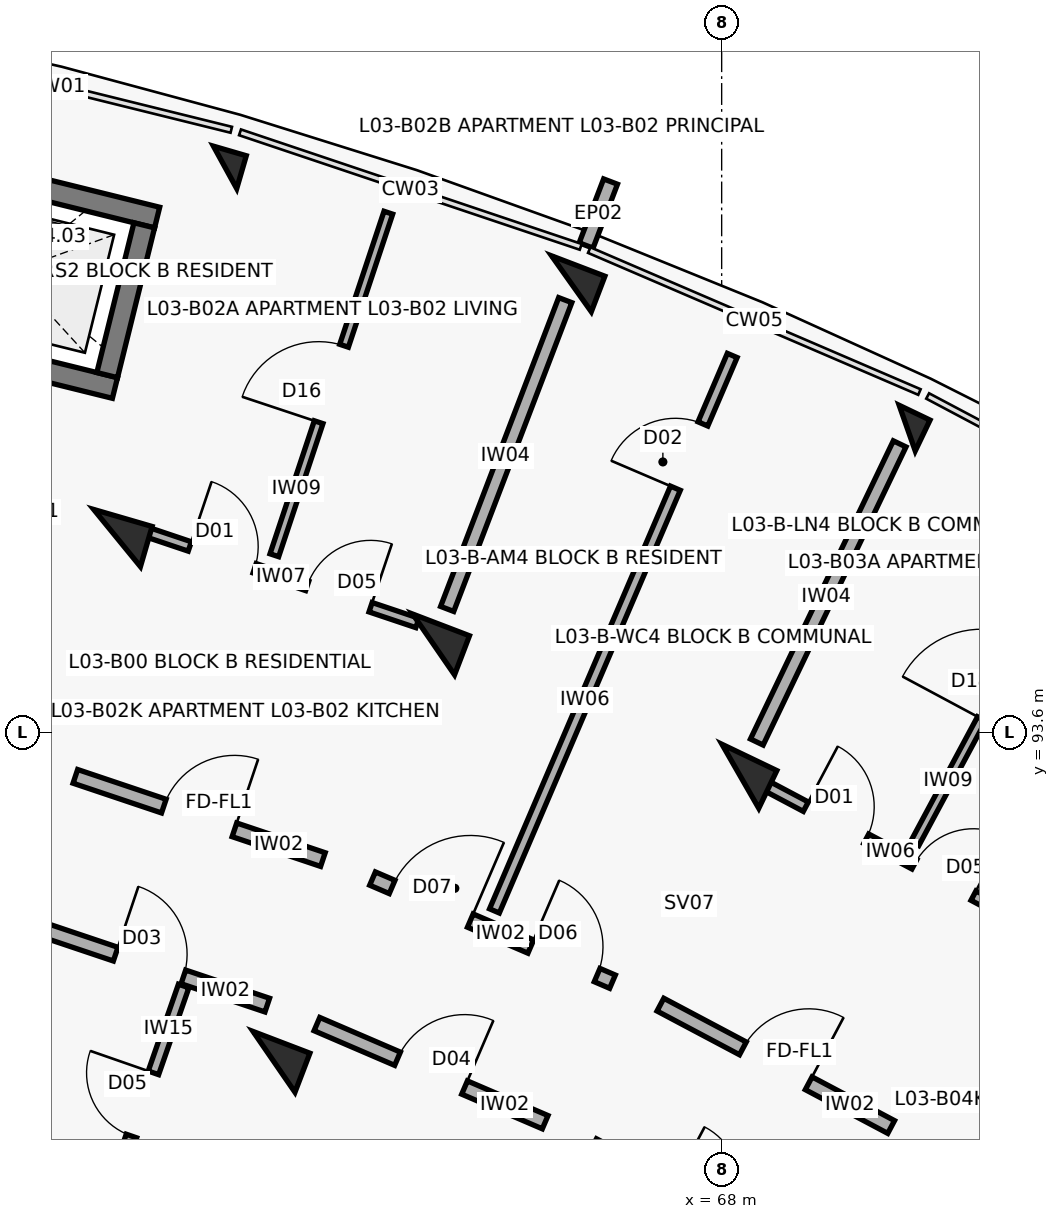
"""IFC4 building model, lengths in metres.
Left out: names, types, materials, properties, quantities, classifications, styles, units other than length and angle.
Written with IfcOpenShell. Run it as: python <this file> out.ifc"""

import sys

from ifc_helpers import new_model, si_unit, direction, frame, frame_2d, origin, origin_2d, place, context, subcontext, project, spatial, rectangle, extrude, element, fill, save


model = new_model("IFC4")
c1 = context("Model", 3, precision=1e-05, world=origin(), true_north=direction((0.0, 1.0)))
c2 = subcontext(c1, "Body", "Model", "MODEL_VIEW")
j1 = project(units=[si_unit("LENGTHUNIT", "METRE"), si_unit("PLANEANGLEUNIT", "RADIAN")], contexts=[c1])
p1 = place(None, origin())
s1 = spatial("IfcSite", under=j1, at=p1, CompositionType="ELEMENT")
p2 = place(p1, origin())
s2 = spatial("IfcBuilding", under=s1, at=p2, CompositionType="ELEMENT")
p3 = place(p2, frame((0.0, 0.0, 11.2)))
s3 = spatial("IfcBuildingStorey", under=s2, at=p3, CompositionType="ELEMENT", Elevation=11.2)
p4 = place(p3, frame((60.046, 96.153, 0.0), z_axis=(0.0, 0.0, 1.0), x_axis=(0.27966144946, 0.96009867914, 0.0)))
e1 = element("IfcColumn", 1, at=p4, inside=s3, PredefinedType="COLUMN", context=c2, shape_type="SweptSolid", body=[
    extrude(rectangle(XDim=0.55, YDim=0.8, at=origin_2d()), origin(), (0.0, 0.0, 1.0), 3.1),
])
p5 = place(p3, frame((61.467, 101.031, 0.0), z_axis=(0.0, 0.0, 1.0), x_axis=(0.27966144946, 0.96009867914, 0.0)))
e2 = element("IfcColumn", 2, at=p5, inside=s3, PredefinedType="COLUMN", context=c2, shape_type="SweptSolid", body=[
    extrude(rectangle(XDim=0.45, YDim=0.45, at=origin_2d()), origin(), (0.0, 0.0, 1.0), 3.1),
])
for number, where, z_axis, x_axis in (
    (3, (62.111, 89.261, 0.0), (0.0, 0.0, 1.0), (0.357, 0.934, 0.0)),
    (4, (64.21, 94.753, 0.0), (0.0, 0.0, 1.0), (0.357, 0.934, 0.0)),
):
    element("IfcColumn", number, at=place(p3, frame(where, z_axis=z_axis, x_axis=x_axis)), inside=s3, PredefinedType="COLUMN", context=c2, shape_type="SweptSolid", body=[
        extrude(rectangle(XDim=0.55, YDim=0.8, at=origin_2d()), origin(), (0.0, 0.0, 1.0), 3.1),
    ])
p6 = place(p3, frame((66.024, 99.499, 0.0), z_axis=(0.0, 0.0, 1.0), x_axis=(0.357064076459, 0.934079892355, 0.0)))
e5 = element("IfcColumn", 5, at=p6, inside=s3, PredefinedType="COLUMN", context=c2, shape_type="SweptSolid", body=[
    extrude(rectangle(XDim=0.5, YDim=0.75, at=origin_2d()), origin(), (0.0, 0.0, 1.0), 3.1),
])
p7 = place(p3, frame((68.246, 93.019, 0.0), z_axis=(0.0, 0.0, 1.0), x_axis=(0.432085748802, 0.901832526405, 0.0)))
e6 = element("IfcColumn", 6, at=p7, inside=s3, PredefinedType="COLUMN", context=c2, shape_type="SweptSolid", body=[
    extrude(rectangle(XDim=0.55, YDim=0.8, at=origin_2d()), origin(), (0.0, 0.0, 1.0), 3.1),
])
p8 = place(p3, frame((70.441, 97.6, 0.0), z_axis=(0.0, 0.0, 1.0), x_axis=(0.432085748802, 0.901832526405, 0.0)))
e7 = element("IfcColumn", 7, at=p8, inside=s3, PredefinedType="COLUMN", context=c2, shape_type="SweptSolid", body=[
    extrude(rectangle(XDim=0.45, YDim=0.45, at=origin_2d()), origin(), (0.0, 0.0, 1.0), 3.1),
])
p9 = place(p3, frame((66.217, 100.003, 0.0), z_axis=(0.0, 0.0, 1.0), x_axis=(0.356942580168, 0.934126326823, 0.0)))
e8 = element("IfcWall", 8, at=p9, inside=s3, PredefinedType="PARAPET", context=c2, shape_type="SweptSolid", body=[
    extrude(rectangle(XDim=0.9, YDim=0.195, at=frame_2d((0.45, 0.0))), origin(), (0.0, 0.0, 1.0), 2.25),
])
p10 = place(p3, frame((60.018, 98.128, 0.0), z_axis=(0.0, 0.0, 1.0), x_axis=(-0.970707542441, 0.240264160972, 0.0)))
e9 = element("IfcWall", 9, at=p10, inside=s3, PredefinedType="SHEAR", context=c2, shape_type="SweptSolid", body=[
    extrude(rectangle(XDim=3.39, YDim=0.28, at=frame_2d((1.695, 0.0))), origin(), (0.0, 0.0, 1.0), 3.1),
])
p11 = place(p10, frame((1.095, 0.0, 0.0)))
e10 = element("IfcOpeningElement", 10, at=p11, cuts=e9, PredefinedType="OPENING", context=c2, shape_type="SweptSolid", body=[
    extrude(rectangle(XDim=1.2, YDim=2.15, at=frame_2d((0.6, 1.075))), frame((0.0, 0.15, 0.0), z_axis=(0.0, -1.0, 0.0), x_axis=(1.0, 0.0, 0.0)), (0.0, 0.0, 1.0), 0.3),
])
p12 = place(p3, frame((60.573, 100.37, 0.0), z_axis=(0.0, 0.0, 1.0), x_axis=(-0.970711699588, 0.240247364777, 0.0)))
e11 = element("IfcWall", 11, at=p12, inside=s3, PredefinedType="SHEAR", context=c2, shape_type="SweptSolid", body=[
    extrude(rectangle(XDim=3.39, YDim=0.28, at=frame_2d((1.695, 0.0))), origin(), (0.0, 0.0, 1.0), 3.1),
])
p13 = place(p3, frame((59.915, 98.297, 0.0), z_axis=(0.0, 0.0, 1.0), x_axis=(0.2402993748, 0.970698825832, 0.0)))
e12 = element("IfcWall", 12, at=p13, inside=s3, PredefinedType="SHEAR", context=c2, shape_type="SweptSolid", body=[
    extrude(rectangle(XDim=2.03, YDim=0.28, at=frame_2d((1.015, 0.0))), origin(), (0.0, 0.0, 1.0), 3.1),
])
p14 = place(p3, frame((59.497, 93.018, 0.0), z_axis=(0.0, 0.0, 1.0), x_axis=(0.947863007629, -0.318678080151, 0.0)))
e13 = element("IfcWall", 13, at=p14, inside=s3, PredefinedType="SOLIDWALL", context=c2, shape_type="SweptSolid", body=[
    extrude(rectangle(XDim=3.436, YDim=0.19, at=frame_2d((1.718, 0.0))), origin(), (0.0, 0.0, 1.0), 2.08),
])
p15 = place(p14, frame((1.228, 0.0, 0.0)))
e14 = element("IfcOpeningElement", 14, at=p15, cuts=e13, PredefinedType="OPENING", context=c2, shape_type="SweptSolid", body=[
    extrude(rectangle(XDim=0.98, YDim=2.15, at=frame_2d((0.49, 1.075))), frame((0.0, 0.105, 0.0), z_axis=(0.0, -1.0, 0.0), x_axis=(1.0, 0.0, 0.0)), (0.0, 0.0, 1.0), 0.21),
])
p16 = place(p3, frame((58.923, 91.049, 0.0), z_axis=(0.0, 0.0, 1.0), x_axis=(0.94787351033, -0.318646839643, 0.0)))
e15 = element("IfcWall", 15, at=p16, inside=s3, PredefinedType="SOLIDWALL", context=c2, shape_type="SweptSolid", body=[
    extrude(rectangle(XDim=3.269, YDim=0.19, at=frame_2d((1.634, 0.0))), origin(), (0.0, 0.0, 1.0), 2.08),
])
p17 = place(p16, frame((1.164, 0.0, 0.0)))
e16 = element("IfcOpeningElement", 16, at=p17, cuts=e15, PredefinedType="OPENING", context=c2, shape_type="SweptSolid", body=[
    extrude(rectangle(XDim=0.94, YDim=2.1, at=frame_2d((0.47, 1.05))), frame((0.0, 0.105, 0.0), z_axis=(0.0, -1.0, 0.0), x_axis=(1.0, 0.0, 0.0)), (0.0, 0.0, 1.0), 0.21),
])
p18 = place(p3, frame((59.837, 87.143, 0.0), z_axis=(0.0, 0.0, 1.0), x_axis=(0.328629662527, 0.944458863534, 0.0)))
e17 = element("IfcWall", 17, at=p18, inside=s3, PredefinedType="PARTITIONING", context=c2, shape_type="SweptSolid", body=[
    extrude(rectangle(XDim=3.3, YDim=0.145, at=frame_2d((1.65, 0.0))), origin(), (0.0, 0.0, 1.0), 2.08),
])
p19 = place(p18, frame((1.21, 0.0, 0.0)))
e18 = element("IfcOpeningElement", 18, at=p19, cuts=e17, PredefinedType="OPENING", context=c2, shape_type="SweptSolid", body=[
    extrude(rectangle(XDim=0.88, YDim=2.1, at=frame_2d((0.44, 1.05))), frame((0.0, 0.083, 0.0), z_axis=(0.0, -1.0, 0.0), x_axis=(1.0, 0.0, 0.0)), (0.0, 0.0, 1.0), 0.165),
])
p20 = place(p3, frame((60.386, 96.25, 0.0), z_axis=(0.0, 0.0, 1.0), x_axis=(0.947879193428, -0.318629933725, 0.0)))
e19 = element("IfcWall", 19, at=p20, inside=s3, PredefinedType="PARTITIONING", context=c2, shape_type="SweptSolid", body=[
    extrude(rectangle(XDim=3.81, YDim=0.13, at=frame_2d((1.905, 0.0))), origin(), (0.0, 0.0, 1.0), 2.08),
])
p21 = place(p20, frame((0.65, 0.0, 0.0)))
e20 = element("IfcOpeningElement", 20, at=p21, cuts=e19, PredefinedType="OPENING", context=c2, shape_type="SweptSolid", body=[
    extrude(rectangle(XDim=0.9, YDim=2.1, at=frame_2d((0.45, 1.05))), frame((0.0, 0.075, 0.0), z_axis=(0.0, -1.0, 0.0), x_axis=(1.0, 0.0, 0.0)), (0.0, 0.0, 1.0), 0.15),
])
p22 = place(p20, frame((2.28, 0.0, 0.0)))
e21 = element("IfcOpeningElement", 21, at=p22, cuts=e19, PredefinedType="OPENING", context=c2, shape_type="SweptSolid", body=[
    extrude(rectangle(XDim=0.88, YDim=2.1, at=frame_2d((0.44, 1.05))), frame((0.0, 0.075, 0.0), z_axis=(0.0, -1.0, 0.0), x_axis=(1.0, 0.0, 0.0)), (0.0, 0.0, 1.0), 0.15),
])
p23 = place(p3, frame((62.115, 95.927, 0.0), z_axis=(0.0, 0.0, 1.0), x_axis=(0.31574970662, 0.94884251737, 0.0)))
e22 = element("IfcWall", 22, at=p23, inside=s3, PredefinedType="PARTITIONING", context=c2, shape_type="SweptSolid", body=[
    extrude(rectangle(XDim=4.75, YDim=0.12, at=frame_2d((2.375, 0.0))), origin(), (0.0, 0.0, 1.0), 2.08),
])
p24 = place(p23, frame((1.845, 0.0, 0.0)))
e23 = element("IfcOpeningElement", 23, at=p24, cuts=e22, PredefinedType="OPENING", context=c2, shape_type="SweptSolid", body=[
    extrude(rectangle(XDim=1.06, YDim=2.1, at=frame_2d((0.53, 1.05))), frame((0.0, 0.07, 0.0), z_axis=(0.0, -1.0, 0.0), x_axis=(1.0, 0.0, 0.0)), (0.0, 0.0, 1.0), 0.14),
])
p25 = place(p3, frame((63.407, 91.673, 0.0), z_axis=(0.0, 0.0, 1.0), x_axis=(0.918718172399, -0.394913813008, 0.0)))
e24 = element("IfcWall", 24, at=p25, inside=s3, PredefinedType="SOLIDWALL", context=c2, shape_type="SweptSolid", body=[
    extrude(rectangle(XDim=3.436, YDim=0.19, at=frame_2d((1.718, 0.0))), origin(), (0.0, 0.0, 1.0), 2.08),
])
p26 = place(p25, frame((0.28, 0.0, 0.0)))
e25 = element("IfcOpeningElement", 25, at=p26, cuts=e24, PredefinedType="OPENING", context=c2, shape_type="SweptSolid", body=[
    extrude(rectangle(XDim=1.12, YDim=2.15, at=frame_2d((0.56, 1.075))), frame((0.0, 0.105, 0.0), z_axis=(0.0, -1.0, 0.0), x_axis=(1.0, 0.0, 0.0)), (0.0, 0.0, 1.0), 0.21),
])
p27 = place(p25, frame((2.266, 0.0, 0.0)))
e26 = element("IfcOpeningElement", 26, at=p27, cuts=e24, PredefinedType="OPENING", context=c2, shape_type="SweptSolid", body=[
    extrude(rectangle(XDim=0.95, YDim=2.1, at=frame_2d((0.475, 1.05))), frame((0.0, 0.105, 0.0), z_axis=(0.0, -1.0, 0.0), x_axis=(1.0, 0.0, 0.0)), (0.0, 0.0, 1.0), 0.21),
])
p28 = place(p3, frame((62.675, 89.758, 0.0), z_axis=(0.0, 0.0, 1.0), x_axis=(0.918723391052, -0.394901672235, 0.0)))
e27 = element("IfcWall", 27, at=p28, inside=s3, PredefinedType="SOLIDWALL", context=c2, shape_type="SweptSolid", body=[
    extrude(rectangle(XDim=3.269, YDim=0.19, at=frame_2d((1.634, 0.0))), origin(), (0.0, 0.0, 1.0), 2.08),
])
p29 = place(p28, frame((1.154, 0.0, 0.0)))
e28 = element("IfcOpeningElement", 28, at=p29, cuts=e27, PredefinedType="OPENING", context=c2, shape_type="SweptSolid", body=[
    extrude(rectangle(XDim=0.96, YDim=2.1, at=frame_2d((0.48, 1.05))), frame((0.0, 0.105, 0.0), z_axis=(0.0, -1.0, 0.0), x_axis=(1.0, 0.0, 0.0)), (0.0, 0.0, 1.0), 0.21),
])
p30 = place(p3, frame((65.01, 91.247, 0.0), z_axis=(0.0, 0.0, 1.0), x_axis=(0.393511564709, 0.919319666079, 0.0)))
e29 = element("IfcWall", 29, at=p30, inside=s3, PredefinedType="PARTITIONING", context=c2, shape_type="SweptSolid", body=[
    extrude(rectangle(XDim=7.95, YDim=0.14, at=frame_2d((3.975, 0.0))), origin(), (0.0, 0.0, 1.0), 2.08),
])
p31 = place(p30, frame((6.05, 0.0, 0.0)))
e30 = element("IfcOpeningElement", 30, at=p31, cuts=e29, PredefinedType="OPENING", context=c2, shape_type="SweptSolid", body=[
    extrude(rectangle(XDim=0.92, YDim=2.1, at=frame_2d((0.46, 1.05))), frame((0.0, 0.08, 0.0), z_axis=(0.0, -1.0, 0.0), x_axis=(1.0, 0.0, 0.0)), (0.0, 0.0, 1.0), 0.16),
])
p32 = place(p3, frame((64.389, 95.22, 0.0), z_axis=(0.0, 0.0, 1.0), x_axis=(0.357064016205, 0.934079915388, 0.0)))
e31 = element("IfcWall", 31, at=p32, inside=s3, PredefinedType="SOLIDWALL", context=c2, shape_type="SweptSolid", body=[
    extrude(rectangle(XDim=4.35, YDim=0.185, at=frame_2d((2.175, 0.0))), origin(), (0.0, 0.0, 1.0), 2.08),
])
p33 = place(p3, frame((67.194, 90.014, 0.0), z_axis=(0.0, 0.0, 1.0), x_axis=(0.883410853063, -0.468599258099, 0.0)))
e32 = element("IfcWall", 32, at=p33, inside=s3, PredefinedType="SOLIDWALL", context=c2, shape_type="SweptSolid", body=[
    extrude(rectangle(XDim=3.436, YDim=0.19, at=frame_2d((1.718, 0.0))), origin(), (0.0, 0.0, 1.0), 2.08),
])
p34 = place(p33, frame((1.228, 0.0, 0.0)))
e33 = element("IfcOpeningElement", 33, at=p34, cuts=e32, PredefinedType="OPENING", context=c2, shape_type="SweptSolid", body=[
    extrude(rectangle(XDim=0.98, YDim=2.15, at=frame_2d((0.49, 1.075))), frame((0.0, 0.105, 0.0), z_axis=(0.0, -1.0, 0.0), x_axis=(1.0, 0.0, 0.0)), (0.0, 0.0, 1.0), 0.21),
])
p35 = place(p3, frame((68.533, 92.923, 0.0), z_axis=(0.0, 0.0, 1.0), x_axis=(0.88341855112, -0.46858474531, 0.0)))
e34 = element("IfcWall", 34, at=p35, inside=s3, PredefinedType="PARTITIONING", context=c2, shape_type="SweptSolid", body=[
    extrude(rectangle(XDim=3.797, YDim=0.14, at=frame_2d((1.898, 0.0))), origin(), (0.0, 0.0, 1.0), 2.08),
])
p36 = place(p35, frame((0.65, 0.0, 0.0)))
e35 = element("IfcOpeningElement", 35, at=p36, cuts=e34, PredefinedType="OPENING", context=c2, shape_type="SweptSolid", body=[
    extrude(rectangle(XDim=0.9, YDim=2.1, at=frame_2d((0.45, 1.05))), frame((0.0, 0.08, 0.0), z_axis=(0.0, -1.0, 0.0), x_axis=(1.0, 0.0, 0.0)), (0.0, 0.0, 1.0), 0.16),
])
p37 = place(p35, frame((2.267, 0.0, 0.0)))
e36 = element("IfcOpeningElement", 36, at=p37, cuts=e34, PredefinedType="OPENING", context=c2, shape_type="SweptSolid", body=[
    extrude(rectangle(XDim=0.88, YDim=2.1, at=frame_2d((0.44, 1.05))), frame((0.0, 0.08, 0.0), z_axis=(0.0, -1.0, 0.0), x_axis=(1.0, 0.0, 0.0)), (0.0, 0.0, 1.0), 0.16),
])
p38 = place(p3, frame((70.541, 92.135, 0.0), z_axis=(0.0, 0.0, 1.0), x_axis=(0.472542158723, 0.881308066586, 0.0)))
e37 = element("IfcWall", 37, at=p38, inside=s3, PredefinedType="PARTITIONING", context=c2, shape_type="SweptSolid", body=[
    extrude(rectangle(XDim=4.9, YDim=0.12, at=frame_2d((2.45, 0.0))), origin(), (0.0, 0.0, 1.0), 2.08),
])
p39 = place(p38, frame((1.86, 0.0, 0.0)))
e38 = element("IfcOpeningElement", 38, at=p39, cuts=e37, PredefinedType="OPENING", context=c2, shape_type="SweptSolid", body=[
    extrude(rectangle(XDim=1.18, YDim=2.1, at=frame_2d((0.59, 1.05))), frame((0.0, 0.07, 0.0), z_axis=(0.0, -1.0, 0.0), x_axis=(1.0, 0.0, 0.0)), (0.0, 0.0, 1.0), 0.14),
])
p40 = place(p3, frame((68.462, 93.469, 0.0), z_axis=(0.0, 0.0, 1.0), x_axis=(0.432086898897, 0.901831975371, 0.0)))
e39 = element("IfcWall", 39, at=p40, inside=s3, PredefinedType="SOLIDWALL", context=c2, shape_type="SweptSolid", body=[
    extrude(rectangle(XDim=4.35, YDim=0.185, at=frame_2d((2.175, 0.0))), origin(), (0.0, 0.0, 1.0), 2.08),
])
p41 = place(p15, origin())
e40 = element("IfcDoor", 40, at=p41, inside=s3, OperationType="SINGLE_SWING_RIGHT", PredefinedType="DOOR", context=c2, shape_type="SweptSolid", body=[
    extrude(rectangle(XDim=0.98, YDim=2.15, at=frame_2d((0.49, 1.075))), frame((0.0, 0.025, 0.0), z_axis=(0.0, -1.0, 0.0), x_axis=(1.0, 0.0, 0.0)), (0.0, 0.0, 1.0), 0.05),
])
fill(e14, e40)
p42 = place(p17, origin())
e41 = element("IfcDoor", 41, at=p42, inside=s3, OperationType="SINGLE_SWING_LEFT", PredefinedType="DOOR", context=c2, shape_type="SweptSolid", body=[
    extrude(rectangle(XDim=0.94, YDim=2.1, at=frame_2d((0.47, 1.05))), frame((0.0, 0.025, 0.0), z_axis=(0.0, -1.0, 0.0), x_axis=(1.0, 0.0, 0.0)), (0.0, 0.0, 1.0), 0.05),
])
fill(e16, e41)
p43 = place(p19, origin())
e42 = element("IfcDoor", 42, at=p43, inside=s3, OperationType="SINGLE_SWING_RIGHT", PredefinedType="DOOR", context=c2, shape_type="SweptSolid", body=[
    extrude(rectangle(XDim=0.88, YDim=2.1, at=frame_2d((0.44, 1.05))), frame((0.0, 0.025, 0.0), z_axis=(0.0, -1.0, 0.0), x_axis=(1.0, 0.0, 0.0)), (0.0, 0.0, 1.0), 0.05),
])
fill(e18, e42)
p44 = place(p21, origin())
e43 = element("IfcDoor", 43, at=p44, inside=s3, OperationType="SINGLE_SWING_LEFT", PredefinedType="DOOR", context=c2, shape_type="SweptSolid", body=[
    extrude(rectangle(XDim=0.9, YDim=2.1, at=frame_2d((0.45, 1.05))), frame((0.0, 0.025, 0.0), z_axis=(0.0, -1.0, 0.0), x_axis=(1.0, 0.0, 0.0)), (0.0, 0.0, 1.0), 0.05),
])
fill(e20, e43)
p45 = place(p22, origin())
e44 = element("IfcDoor", 44, at=p45, inside=s3, OperationType="SINGLE_SWING_RIGHT", PredefinedType="DOOR", context=c2, shape_type="SweptSolid", body=[
    extrude(rectangle(XDim=0.88, YDim=2.1, at=frame_2d((0.44, 1.05))), frame((0.0, 0.025, 0.0), z_axis=(0.0, -1.0, 0.0), x_axis=(1.0, 0.0, 0.0)), (0.0, 0.0, 1.0), 0.05),
])
fill(e21, e44)
p46 = place(p24, origin())
e45 = element("IfcDoor", 45, at=p46, inside=s3, OperationType="SINGLE_SWING_LEFT", PredefinedType="DOOR", context=c2, shape_type="SweptSolid", body=[
    extrude(rectangle(XDim=1.06, YDim=2.1, at=frame_2d((0.53, 1.05))), frame((0.0, 0.025, 0.0), z_axis=(0.0, -1.0, 0.0), x_axis=(1.0, 0.0, 0.0)), (0.0, 0.0, 1.0), 0.05),
])
fill(e23, e45)
p47 = place(p26, origin())
e46 = element("IfcDoor", 46, at=p47, inside=s3, OperationType="SINGLE_SWING_RIGHT", PredefinedType="DOOR", context=c2, shape_type="SweptSolid", body=[
    extrude(rectangle(XDim=1.12, YDim=2.15, at=frame_2d((0.56, 1.075))), frame((0.0, 0.025, 0.0), z_axis=(0.0, -1.0, 0.0), x_axis=(1.0, 0.0, 0.0)), (0.0, 0.0, 1.0), 0.05),
])
fill(e25, e46)
p48 = place(p27, origin())
e47 = element("IfcDoor", 47, at=p48, inside=s3, OperationType="SINGLE_SWING_LEFT", PredefinedType="DOOR", context=c2, shape_type="SweptSolid", body=[
    extrude(rectangle(XDim=0.95, YDim=2.1, at=frame_2d((0.475, 1.05))), frame((0.0, 0.025, 0.0), z_axis=(0.0, -1.0, 0.0), x_axis=(1.0, 0.0, 0.0)), (0.0, 0.0, 1.0), 0.05),
])
fill(e26, e47)
p49 = place(p29, origin())
e48 = element("IfcDoor", 48, at=p49, inside=s3, OperationType="SINGLE_SWING_RIGHT", PredefinedType="DOOR", context=c2, shape_type="SweptSolid", body=[
    extrude(rectangle(XDim=0.96, YDim=2.1, at=frame_2d((0.48, 1.05))), frame((0.0, 0.025, 0.0), z_axis=(0.0, -1.0, 0.0), x_axis=(1.0, 0.0, 0.0)), (0.0, 0.0, 1.0), 0.05),
])
fill(e28, e48)
p50 = place(p31, origin())
e49 = element("IfcDoor", 49, at=p50, inside=s3, OperationType="SINGLE_SWING_LEFT", PredefinedType="DOOR", context=c2, shape_type="SweptSolid", body=[
    extrude(rectangle(XDim=0.92, YDim=2.1, at=frame_2d((0.46, 1.05))), frame((0.0, 0.025, 0.0), z_axis=(0.0, -1.0, 0.0), x_axis=(1.0, 0.0, 0.0)), (0.0, 0.0, 1.0), 0.05),
])
fill(e30, e49)
p51 = place(p34, origin())
e50 = element("IfcDoor", 50, at=p51, inside=s3, OperationType="SINGLE_SWING_RIGHT", PredefinedType="DOOR", context=c2, shape_type="SweptSolid", body=[
    extrude(rectangle(XDim=0.98, YDim=2.15, at=frame_2d((0.49, 1.075))), frame((0.0, 0.025, 0.0), z_axis=(0.0, -1.0, 0.0), x_axis=(1.0, 0.0, 0.0)), (0.0, 0.0, 1.0), 0.05),
])
fill(e33, e50)
p52 = place(p36, origin())
e51 = element("IfcDoor", 51, at=p52, inside=s3, OperationType="SINGLE_SWING_LEFT", PredefinedType="DOOR", context=c2, shape_type="SweptSolid", body=[
    extrude(rectangle(XDim=0.9, YDim=2.1, at=frame_2d((0.45, 1.05))), frame((0.0, 0.025, 0.0), z_axis=(0.0, -1.0, 0.0), x_axis=(1.0, 0.0, 0.0)), (0.0, 0.0, 1.0), 0.05),
])
fill(e35, e51)
p53 = place(p37, origin())
e52 = element("IfcDoor", 52, at=p53, inside=s3, OperationType="SINGLE_SWING_RIGHT", PredefinedType="DOOR", context=c2, shape_type="SweptSolid", body=[
    extrude(rectangle(XDim=0.88, YDim=2.1, at=frame_2d((0.44, 1.05))), frame((0.0, 0.025, 0.0), z_axis=(0.0, -1.0, 0.0), x_axis=(1.0, 0.0, 0.0)), (0.0, 0.0, 1.0), 0.05),
])
fill(e36, e52)
save(model, sys.argv[1])
